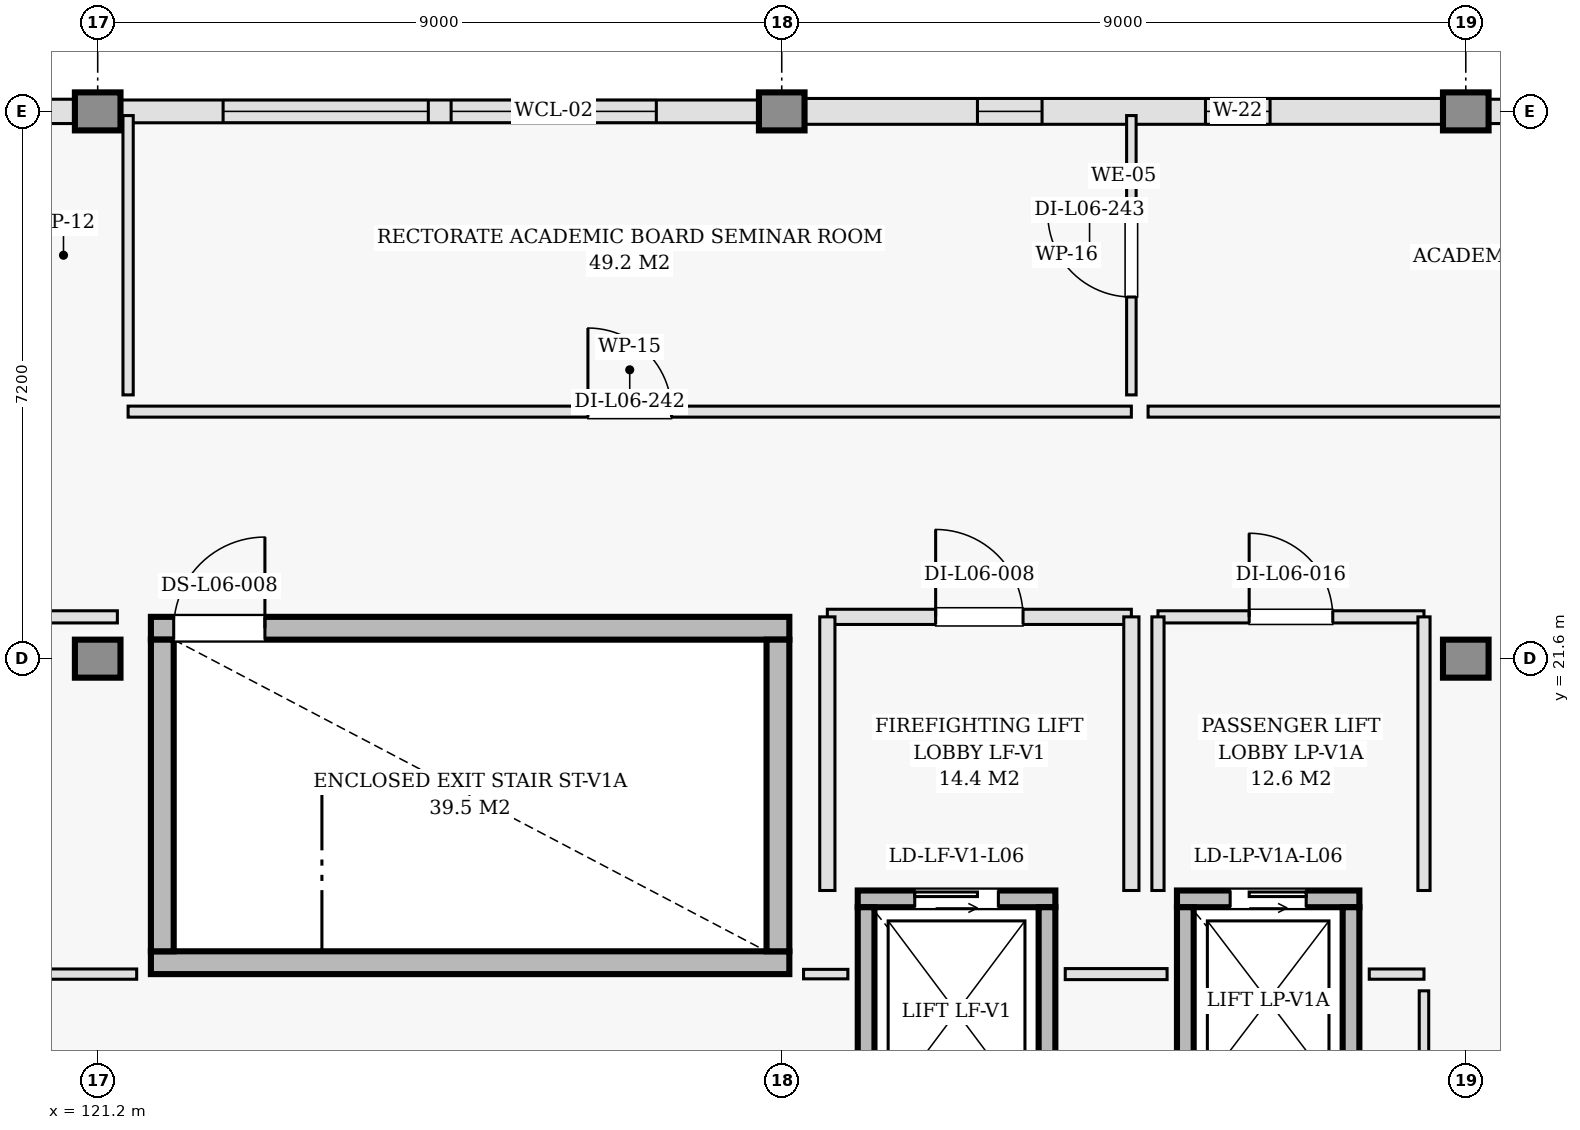
"""IFC4 building model, lengths in metres.
Left out: names, types, materials, properties, quantities, classifications, styles, units other than length and angle.
Written with IfcOpenShell. Run it as: python <this file> out.ifc"""

import sys

from ifc_helpers import new_model, si_unit, direction, frame, frame_2d, origin, origin_2d, place, context, subcontext, project, spatial, rectangle, extrude, element, fill, save


model = new_model("IFC4")
c1 = context("Model", 3, precision=1e-05, world=origin(), true_north=direction((0.0, 1.0)))
c2 = subcontext(c1, "Body", "Model", "MODEL_VIEW")
j1 = project(units=[si_unit("LENGTHUNIT", "METRE"), si_unit("PLANEANGLEUNIT", "RADIAN")], contexts=[c1])
p1 = place(None, origin())
s1 = spatial("IfcSite", under=j1, at=p1, CompositionType="ELEMENT")
p2 = place(p1, origin())
s2 = spatial("IfcBuilding", under=s1, at=p2, CompositionType="ELEMENT")
p3 = place(p2, frame((0.0, 0.0, 26.4)))
s3 = spatial("IfcBuildingStorey", under=s2, at=p3, CompositionType="ELEMENT", Elevation=26.4)
for number, where, z_axis, x_axis in (
    (1, (121.2, 21.6, 0.0), (0.0, 0.0, 1.0), (1.0, 0.0, 0.0)),
    (2, (121.2, 28.8, 0.0), (0.0, 0.0, 1.0), (1.0, 0.0, 0.0)),
    (3, (130.2, 28.8, 0.0), (0.0, 0.0, 1.0), (1.0, 0.0, 0.0)),
    (4, (139.2, 21.6, 0.0), (0.0, 0.0, 1.0), (1.0, 0.0, 0.0)),
    (5, (139.2, 28.8, 0.0), (0.0, 0.0, 1.0), (1.0, 0.0, 0.0)),
):
    element("IfcColumn", number, at=place(p3, frame(where, z_axis=z_axis, x_axis=x_axis)), inside=s3, PredefinedType="COLUMN", context=c2, shape_type="SweptSolid", body=[
        extrude(rectangle(XDim=0.5, YDim=0.5, at=origin_2d()), origin(), (0.0, 0.0, 1.0), 3.45),
    ])
p4 = place(p3, frame((148.2, 28.8, 0.0), z_axis=(0.0, 0.0, 1.0), x_axis=(-1.0, 0.0, 0.0)))
e6 = element("IfcWall", 6, at=p4, inside=s3, PredefinedType="SOLIDWALL", context=c2, shape_type="SweptSolid", body=[
    extrude(rectangle(XDim=9.0, YDim=0.32, at=frame_2d((4.5, 0.0))), origin(), (0.0, 0.0, 1.0), 2.555),
])
p5 = place(p4, frame((2.475, 0.0, 0.9)))
e7 = element("IfcOpeningElement", 7, at=p5, cuts=e6, PredefinedType="OPENING", context=c2, shape_type="SweptSolid", body=[
    extrude(rectangle(XDim=1.05, YDim=1.4, at=frame_2d((0.525, 0.7))), frame((0.0, 0.17, 0.0), z_axis=(0.0, -1.0, 0.0), x_axis=(1.0, 0.0, 0.0)), (0.0, 0.0, 1.0), 0.34),
])
p6 = place(p4, frame((5.475, 0.0, 0.9)))
e8 = element("IfcOpeningElement", 8, at=p6, cuts=e6, PredefinedType="OPENING", context=c2, shape_type="SweptSolid", body=[
    extrude(rectangle(XDim=1.05, YDim=1.4, at=frame_2d((0.525, 0.7))), frame((0.0, 0.17, 0.0), z_axis=(0.0, -1.0, 0.0), x_axis=(1.0, 0.0, 0.0)), (0.0, 0.0, 1.0), 0.34),
])
p7 = place(p3, frame((139.2, 28.8, 0.0), z_axis=(0.0, 0.0, 1.0), x_axis=(-1.0, 0.0, 0.0)))
e9 = element("IfcWall", 9, at=p7, inside=s3, PredefinedType="SOLIDWALL", context=c2, shape_type="SweptSolid", body=[
    extrude(rectangle(XDim=9.0, YDim=0.34, at=frame_2d((4.5, 0.0))), origin(), (0.0, 0.0, 1.0), 2.555),
])
p8 = place(p7, frame((2.575, 0.0, 0.9)))
e10 = element("IfcOpeningElement", 10, at=p8, cuts=e9, PredefinedType="OPENING", context=c2, shape_type="SweptSolid", body=[
    extrude(rectangle(XDim=0.85, YDim=1.3, at=frame_2d((0.425, 0.65))), frame((0.0, 0.18, 0.0), z_axis=(0.0, -1.0, 0.0), x_axis=(1.0, 0.0, 0.0)), (0.0, 0.0, 1.0), 0.36),
])
p9 = place(p7, frame((5.575, 0.0, 0.9)))
e11 = element("IfcOpeningElement", 11, at=p9, cuts=e9, PredefinedType="OPENING", context=c2, shape_type="SweptSolid", body=[
    extrude(rectangle(XDim=0.85, YDim=1.3, at=frame_2d((0.425, 0.65))), frame((0.0, 0.18, 0.0), z_axis=(0.0, -1.0, 0.0), x_axis=(1.0, 0.0, 0.0)), (0.0, 0.0, 1.0), 0.36),
])
p10 = place(p3, frame((130.2, 28.8, 0.0), z_axis=(0.0, 0.0, 1.0), x_axis=(-1.0, 0.0, 0.0)))
e12 = element("IfcWall", 12, at=p10, inside=s3, PredefinedType="SOLIDWALL", context=c2, shape_type="SweptSolid", body=[
    extrude(rectangle(XDim=9.0, YDim=0.3, at=frame_2d((4.5, 0.0))), origin(), (0.0, 0.0, 1.0), 2.555),
])
p11 = place(p10, frame((1.65, 0.0, 1.285)))
e13 = element("IfcOpeningElement", 13, at=p11, cuts=e12, PredefinedType="OPENING", context=c2, shape_type="SweptSolid", body=[
    extrude(rectangle(XDim=2.7, YDim=1.05, at=frame_2d((1.35, 0.525))), frame((0.0, 0.16, 0.0), z_axis=(0.0, -1.0, 0.0), x_axis=(1.0, 0.0, 0.0)), (0.0, 0.0, 1.0), 0.32),
])
p12 = place(p10, frame((4.65, 0.0, 1.285)))
e14 = element("IfcOpeningElement", 14, at=p12, cuts=e12, PredefinedType="OPENING", context=c2, shape_type="SweptSolid", body=[
    extrude(rectangle(XDim=2.7, YDim=1.05, at=frame_2d((1.35, 0.525))), frame((0.0, 0.16, 0.0), z_axis=(0.0, -1.0, 0.0), x_axis=(1.0, 0.0, 0.0)), (0.0, 0.0, 1.0), 0.32),
])
p13 = place(p3, frame((121.2, 28.8, 0.0), z_axis=(0.0, 0.0, 1.0), x_axis=(-1.0, 0.0, 0.0)))
e15 = element("IfcWall", 15, at=p13, inside=s3, PredefinedType="SOLIDWALL", context=c2, shape_type="SweptSolid", body=[
    extrude(rectangle(XDim=8.75, YDim=0.32, at=frame_2d((4.375, 0.0))), origin(), (0.0, 0.0, 1.0), 2.555),
])
p14 = place(p13, frame((2.442, 0.0, 1.385)))
e16 = element("IfcOpeningElement", 16, at=p14, cuts=e15, PredefinedType="OPENING", context=c2, shape_type="SweptSolid", body=[
    extrude(rectangle(XDim=0.95, YDim=0.95, at=frame_2d((0.475, 0.475))), frame((0.0, 0.17, 0.0), z_axis=(0.0, -1.0, 0.0), x_axis=(1.0, 0.0, 0.0)), (0.0, 0.0, 1.0), 0.34),
])
p15 = place(p13, frame((4.783, 0.0, 1.385)))
e17 = element("IfcOpeningElement", 17, at=p15, cuts=e15, PredefinedType="OPENING", context=c2, shape_type="SweptSolid", body=[
    extrude(rectangle(XDim=2.1, YDim=0.95, at=frame_2d((1.05, 0.475))), frame((0.0, 0.17, 0.0), z_axis=(0.0, -1.0, 0.0), x_axis=(1.0, 0.0, 0.0)), (0.0, 0.0, 1.0), 0.34),
])
p16 = place(p3, frame((121.9, 17.6, 0.0), z_axis=(0.0, 0.0, 1.0), x_axis=(1.0, 0.0, 0.0)))
e18 = element("IfcWall", 18, at=p16, inside=s3, PredefinedType="SHEAR", context=c2, shape_type="SweptSolid", body=[
    extrude(rectangle(XDim=8.4, YDim=0.3, at=frame_2d((4.2, 0.0))), origin(), (0.0, 0.0, 1.0), 3.22),
])
p17 = place(p3, frame((121.9, 22.0, 0.0), z_axis=(0.0, 0.0, 1.0), x_axis=(1.0, 0.0, 0.0)))
e19 = element("IfcWall", 19, at=p17, inside=s3, PredefinedType="SHEAR", context=c2, shape_type="SweptSolid", body=[
    extrude(rectangle(XDim=8.4, YDim=0.3, at=frame_2d((4.2, 0.0))), origin(), (0.0, 0.0, 1.0), 3.22),
])
p18 = place(p17, frame((0.3, 0.0, 0.0)))
e20 = element("IfcOpeningElement", 20, at=p18, cuts=e19, PredefinedType="OPENING", context=c2, shape_type="SweptSolid", body=[
    extrude(rectangle(XDim=1.2, YDim=2.15, at=frame_2d((0.6, 1.075))), frame((0.0, 0.16, 0.0), z_axis=(0.0, -1.0, 0.0), x_axis=(1.0, 0.0, 0.0)), (0.0, 0.0, 1.0), 0.32),
])
for number, where, z_axis, x_axis in (
    (21, (122.05, 17.75, 0.0), (0.0, 0.0, 1.0), (0.0, 1.0, 0.0)),
    (22, (130.15, 17.75, 0.0), (0.0, 0.0, 1.0), (0.0, 1.0, 0.0)),
):
    element("IfcWall", number, at=place(p3, frame(where, z_axis=z_axis, x_axis=x_axis)), inside=s3, PredefinedType="SHEAR", context=c2, shape_type="SweptSolid", body=[
        extrude(rectangle(XDim=4.1, YDim=0.3, at=frame_2d((2.05, 0.0))), origin(), (0.0, 0.0, 1.0), 3.22),
    ])
p19 = place(p3, frame((131.2, 18.44, 0.0), z_axis=(0.0, 0.0, 1.0), x_axis=(1.0, 0.0, 0.0)))
e23 = element("IfcWall", 23, at=p19, inside=s3, PredefinedType="SHEAR", context=c2, shape_type="SweptSolid", body=[
    extrude(rectangle(XDim=2.6, YDim=0.22, at=frame_2d((1.3, 0.0))), origin(), (0.0, 0.0, 1.0), 3.22),
])
p20 = place(p19, frame((0.75, 0.0, 0.0)))
e24 = element("IfcOpeningElement", 24, at=p20, cuts=e23, PredefinedType="OPENING", context=c2, shape_type="SweptSolid", body=[
    extrude(rectangle(XDim=1.1, YDim=2.15, at=frame_2d((0.55, 1.075))), frame((0.0, 0.12, 0.0), z_axis=(0.0, -1.0, 0.0), x_axis=(1.0, 0.0, 0.0)), (0.0, 0.0, 1.0), 0.24),
])
for number, where, z_axis, x_axis in (
    (25, (131.31, 15.57, 0.0), (0.0, 0.0, 1.0), (0.0, 1.0, 0.0)),
    (26, (133.69, 15.57, 0.0), (0.0, 0.0, 1.0), (0.0, 1.0, 0.0)),
):
    element("IfcWall", number, at=place(p3, frame(where, z_axis=z_axis, x_axis=x_axis)), inside=s3, PredefinedType="SHEAR", context=c2, shape_type="SweptSolid", body=[
        extrude(rectangle(XDim=2.76, YDim=0.22, at=frame_2d((1.38, 0.0))), origin(), (0.0, 0.0, 1.0), 3.22),
    ])
p21 = place(p3, frame((130.8, 22.15, 0.0), z_axis=(0.0, 0.0, 1.0), x_axis=(1.0, 0.0, 0.0)))
e27 = element("IfcWall", 27, at=p21, inside=s3, PredefinedType="PARTITIONING", context=c2, shape_type="SweptSolid", body=[
    extrude(rectangle(XDim=4.0, YDim=0.2, at=frame_2d((2.0, 0.0))), origin(), (0.0, 0.0, 1.0), 3.22),
])
p22 = place(p21, frame((1.425, 0.0, 0.0)))
e28 = element("IfcOpeningElement", 28, at=p22, cuts=e27, PredefinedType="OPENING", context=c2, shape_type="SweptSolid", body=[
    extrude(rectangle(XDim=1.15, YDim=2.15, at=frame_2d((0.575, 1.075))), frame((0.0, 0.11, 0.0), z_axis=(0.0, -1.0, 0.0), x_axis=(1.0, 0.0, 0.0)), (0.0, 0.0, 1.0), 0.22),
])
for number, where, z_axis, x_axis in (
    (29, (130.8, 18.55, 0.0), (0.0, 0.0, 1.0), (0.0, 1.0, 0.0)),
    (30, (134.8, 18.55, 0.0), (0.0, 0.0, 1.0), (0.0, 1.0, 0.0)),
):
    element("IfcWall", number, at=place(p3, frame(where, z_axis=z_axis, x_axis=x_axis)), inside=s3, PredefinedType="PARTITIONING", context=c2, shape_type="SweptSolid", body=[
        extrude(rectangle(XDim=3.6, YDim=0.2, at=frame_2d((1.8, 0.0))), origin(), (0.0, 0.0, 1.0), 2.405),
    ])
p23 = place(p3, frame((135.4, 18.44, 0.0), z_axis=(0.0, 0.0, 1.0), x_axis=(1.0, 0.0, 0.0)))
e31 = element("IfcWall", 31, at=p23, inside=s3, PredefinedType="SHEAR", context=c2, shape_type="SweptSolid", body=[
    extrude(rectangle(XDim=2.4, YDim=0.22, at=frame_2d((1.2, 0.0))), origin(), (0.0, 0.0, 1.0), 3.22),
])
p24 = place(p23, frame((0.7, 0.0, 0.0)))
e32 = element("IfcOpeningElement", 32, at=p24, cuts=e31, PredefinedType="OPENING", context=c2, shape_type="SweptSolid", body=[
    extrude(rectangle(XDim=1.0, YDim=2.15, at=frame_2d((0.5, 1.075))), frame((0.0, 0.12, 0.0), z_axis=(0.0, -1.0, 0.0), x_axis=(1.0, 0.0, 0.0)), (0.0, 0.0, 1.0), 0.24),
])
for number, where, z_axis, x_axis in (
    (33, (135.51, 15.87, 0.0), (0.0, 0.0, 1.0), (0.0, 1.0, 0.0)),
    (34, (137.69, 15.87, 0.0), (0.0, 0.0, 1.0), (0.0, 1.0, 0.0)),
):
    element("IfcWall", number, at=place(p3, frame(where, z_axis=z_axis, x_axis=x_axis)), inside=s3, PredefinedType="SHEAR", context=c2, shape_type="SweptSolid", body=[
        extrude(rectangle(XDim=2.46, YDim=0.22, at=frame_2d((1.23, 0.0))), origin(), (0.0, 0.0, 1.0), 3.22),
    ])
p25 = place(p3, frame((135.15, 22.15, 0.0), z_axis=(0.0, 0.0, 1.0), x_axis=(1.0, 0.0, 0.0)))
e35 = element("IfcWall", 35, at=p25, inside=s3, PredefinedType="PARTITIONING", context=c2, shape_type="SweptSolid", body=[
    extrude(rectangle(XDim=3.5, YDim=0.16, at=frame_2d((1.75, 0.0))), origin(), (0.0, 0.0, 1.0), 3.22),
])
p26 = place(p25, frame((1.2, 0.0, 0.0)))
e36 = element("IfcOpeningElement", 36, at=p26, cuts=e35, PredefinedType="OPENING", context=c2, shape_type="SweptSolid", body=[
    extrude(rectangle(XDim=1.1, YDim=2.15, at=frame_2d((0.55, 1.075))), frame((0.0, 0.09, 0.0), z_axis=(0.0, -1.0, 0.0), x_axis=(1.0, 0.0, 0.0)), (0.0, 0.0, 1.0), 0.18),
])
for number, where, z_axis, x_axis in (
    (37, (135.15, 18.55, 0.0), (0.0, 0.0, 1.0), (0.0, 1.0, 0.0)),
    (38, (138.65, 18.55, 0.0), (0.0, 0.0, 1.0), (0.0, 1.0, 0.0)),
):
    element("IfcWall", number, at=place(p3, frame(where, z_axis=z_axis, x_axis=x_axis)), inside=s3, PredefinedType="PARTITIONING", context=c2, shape_type="SweptSolid", body=[
        extrude(rectangle(XDim=3.6, YDim=0.16, at=frame_2d((1.8, 0.0))), origin(), (0.0, 0.0, 1.0), 2.405),
    ])
p27 = place(p3, frame((121.6, 24.85, 0.0), z_axis=(0.0, 0.0, 1.0), x_axis=(1.0, 0.0, 0.0)))
e39 = element("IfcWall", 39, at=p27, inside=s3, PredefinedType="PARTITIONING", context=c2, shape_type="SweptSolid", body=[
    extrude(rectangle(XDim=13.2, YDim=0.145, at=frame_2d((6.6, 0.0))), origin(), (0.0, 0.0, 1.0), 2.555),
])
p28 = place(p27, frame((6.05, 0.0, 0.0)))
e40 = element("IfcOpeningElement", 40, at=p28, cuts=e39, PredefinedType="OPENING", context=c2, shape_type="SweptSolid", body=[
    extrude(rectangle(XDim=1.1, YDim=2.15, at=frame_2d((0.55, 1.075))), frame((0.0, 0.083, 0.0), z_axis=(0.0, -1.0, 0.0), x_axis=(1.0, 0.0, 0.0)), (0.0, 0.0, 1.0), 0.165),
])
p29 = place(p3, frame((121.6, 25.07, 0.0), z_axis=(0.0, 0.0, 1.0), x_axis=(0.0, 1.0, 0.0)))
e41 = element("IfcWall", 41, at=p29, inside=s3, PredefinedType="PARTITIONING", context=c2, shape_type="SweptSolid", body=[
    extrude(rectangle(XDim=3.675, YDim=0.135, at=frame_2d((1.837, 0.0))), origin(), (0.0, 0.0, 1.0), 3.22),
])
p30 = place(p3, frame((134.8, 25.07, 0.0), z_axis=(0.0, 0.0, 1.0), x_axis=(0.0, 1.0, 0.0)))
e42 = element("IfcWall", 42, at=p30, inside=s3, PredefinedType="PARTITIONING", context=c2, shape_type="SweptSolid", body=[
    extrude(rectangle(XDim=3.675, YDim=0.125, at=frame_2d((1.837, 0.0))), origin(), (0.0, 0.0, 1.0), 3.22),
])
p31 = place(p30, frame((1.288, 0.0, 0.0)))
e43 = element("IfcOpeningElement", 43, at=p31, cuts=e42, PredefinedType="OPENING", context=c2, shape_type="SweptSolid", body=[
    extrude(rectangle(XDim=1.1, YDim=2.15, at=frame_2d((0.55, 1.075))), frame((0.0, 0.073, 0.0), z_axis=(0.0, -1.0, 0.0), x_axis=(1.0, 0.0, 0.0)), (0.0, 0.0, 1.0), 0.145),
])
p32 = place(p3, frame((135.02, 24.85, 0.0), z_axis=(0.0, 0.0, 1.0), x_axis=(1.0, 0.0, 0.0)))
e44 = element("IfcWall", 44, at=p32, inside=s3, PredefinedType="PARTITIONING", context=c2, shape_type="SweptSolid", body=[
    extrude(rectangle(XDim=13.18, YDim=0.145, at=frame_2d((6.59, 0.0))), origin(), (0.0, 0.0, 1.0), 2.555),
])
p33 = place(p3, frame((119.82, 17.45, 0.0), z_axis=(0.0, 0.0, 1.0), x_axis=(1.0, 0.0, 0.0)))
e45 = element("IfcWall", 45, at=p33, inside=s3, PredefinedType="PARTITIONING", context=c2, shape_type="SweptSolid", body=[
    extrude(rectangle(XDim=1.893, YDim=0.135, at=frame_2d((0.946, 0.0))), origin(), (0.0, 0.0, 1.0), 2.555),
])
p34 = place(p3, frame((130.487, 17.45, 0.0), z_axis=(0.0, 0.0, 1.0), x_axis=(1.0, 0.0, 0.0)))
e46 = element("IfcWall", 46, at=p34, inside=s3, PredefinedType="PARTITIONING", context=c2, shape_type="SweptSolid", body=[
    extrude(rectangle(XDim=0.583, YDim=0.125, at=frame_2d((0.292, 0.0))), origin(), (0.0, 0.0, 1.0), 3.22),
])
p35 = place(p3, frame((133.93, 17.45, 0.0), z_axis=(0.0, 0.0, 1.0), x_axis=(1.0, 0.0, 0.0)))
e47 = element("IfcWall", 47, at=p35, inside=s3, PredefinedType="PARTITIONING", context=c2, shape_type="SweptSolid", body=[
    extrude(rectangle(XDim=1.34, YDim=0.145, at=frame_2d((0.67, 0.0))), origin(), (0.0, 0.0, 1.0), 3.22),
])
p36 = place(p3, frame((137.93, 17.45, 0.0), z_axis=(0.0, 0.0, 1.0), x_axis=(1.0, 0.0, 0.0)))
e48 = element("IfcWall", 48, at=p36, inside=s3, PredefinedType="PARTITIONING", context=c2, shape_type="SweptSolid", body=[
    extrude(rectangle(XDim=0.72, YDim=0.135, at=frame_2d((0.36, 0.0))), origin(), (0.0, 0.0, 1.0), 3.22),
])
p37 = place(p3, frame((138.65, 14.6, 0.0), z_axis=(0.0, 0.0, 1.0), x_axis=(0.0, 1.0, 0.0)))
e49 = element("IfcWall", 49, at=p37, inside=s3, PredefinedType="PARTITIONING", context=c2, shape_type="SweptSolid", body=[
    extrude(rectangle(XDim=2.63, YDim=0.125, at=frame_2d((1.315, 0.0))), origin(), (0.0, 0.0, 1.0), 2.405),
])
p38 = place(p3, frame((119.6, 22.15, 0.0), z_axis=(0.0, 0.0, 1.0), x_axis=(1.0, 0.0, 0.0)))
e50 = element("IfcWall", 50, at=p38, inside=s3, PredefinedType="PARTITIONING", context=c2, shape_type="SweptSolid", body=[
    extrude(rectangle(XDim=1.859, YDim=0.16, at=frame_2d((0.929, 0.0))), origin(), (0.0, 0.0, 1.0), 2.555),
])
p39 = place(p8, origin())
e51 = element("IfcWindow", 51, at=p39, inside=s3, PartitioningType="DOUBLE_PANEL_VERTICAL", PredefinedType="WINDOW", context=c2, shape_type="SweptSolid", body=[
    extrude(rectangle(XDim=0.85, YDim=1.3, at=frame_2d((0.425, 0.65))), frame((0.0, 0.03, 0.0), z_axis=(0.0, -1.0, 0.0), x_axis=(1.0, 0.0, 0.0)), (0.0, 0.0, 1.0), 0.06),
])
fill(e10, e51)
p40 = place(p9, origin())
e52 = element("IfcWindow", 52, at=p40, inside=s3, PartitioningType="DOUBLE_PANEL_VERTICAL", PredefinedType="WINDOW", context=c2, shape_type="SweptSolid", body=[
    extrude(rectangle(XDim=0.85, YDim=1.3, at=frame_2d((0.425, 0.65))), frame((0.0, 0.03, 0.0), z_axis=(0.0, -1.0, 0.0), x_axis=(1.0, 0.0, 0.0)), (0.0, 0.0, 1.0), 0.06),
])
fill(e11, e52)
p41 = place(p11, origin())
e53 = element("IfcWindow", 53, at=p41, inside=s3, PartitioningType="DOUBLE_PANEL_VERTICAL", PredefinedType="WINDOW", context=c2, shape_type="SweptSolid", body=[
    extrude(rectangle(XDim=2.7, YDim=1.05, at=frame_2d((1.35, 0.525))), frame((0.0, 0.03, 0.0), z_axis=(0.0, -1.0, 0.0), x_axis=(1.0, 0.0, 0.0)), (0.0, 0.0, 1.0), 0.06),
])
fill(e13, e53)
p42 = place(p12, origin())
e54 = element("IfcWindow", 54, at=p42, inside=s3, PartitioningType="DOUBLE_PANEL_VERTICAL", PredefinedType="WINDOW", context=c2, shape_type="SweptSolid", body=[
    extrude(rectangle(XDim=2.7, YDim=1.05, at=frame_2d((1.35, 0.525))), frame((0.0, 0.03, 0.0), z_axis=(0.0, -1.0, 0.0), x_axis=(1.0, 0.0, 0.0)), (0.0, 0.0, 1.0), 0.06),
])
fill(e14, e54)
p43 = place(p18, origin())
e55 = element("IfcDoor", 55, at=p43, inside=s3, OperationType="SINGLE_SWING_RIGHT", PredefinedType="DOOR", context=c2, shape_type="SweptSolid", body=[
    extrude(rectangle(XDim=1.2, YDim=2.15, at=frame_2d((0.6, 1.075))), frame((0.0, 0.025, 0.0), z_axis=(0.0, -1.0, 0.0), x_axis=(1.0, 0.0, 0.0)), (0.0, 0.0, 1.0), 0.05),
])
fill(e20, e55)
p44 = place(p20, origin())
e56 = element("IfcDoor", 56, at=p44, inside=s3, OperationType="SLIDING_TO_LEFT", PredefinedType="DOOR", context=c2, shape_type="SweptSolid", body=[
    extrude(rectangle(XDim=1.1, YDim=2.15, at=frame_2d((0.55, 1.075))), frame((0.0, 0.025, 0.0), z_axis=(0.0, -1.0, 0.0), x_axis=(1.0, 0.0, 0.0)), (0.0, 0.0, 1.0), 0.05),
])
fill(e24, e56)
p45 = place(p22, origin())
e57 = element("IfcDoor", 57, at=p45, inside=s3, OperationType="SINGLE_SWING_LEFT", PredefinedType="DOOR", context=c2, shape_type="SweptSolid", body=[
    extrude(rectangle(XDim=1.15, YDim=2.15, at=frame_2d((0.575, 1.075))), frame((0.0, 0.025, 0.0), z_axis=(0.0, -1.0, 0.0), x_axis=(1.0, 0.0, 0.0)), (0.0, 0.0, 1.0), 0.05),
])
fill(e28, e57)
p46 = place(p24, origin())
e58 = element("IfcDoor", 58, at=p46, inside=s3, OperationType="SLIDING_TO_RIGHT", PredefinedType="DOOR", context=c2, shape_type="SweptSolid", body=[
    extrude(rectangle(XDim=1.0, YDim=2.15, at=frame_2d((0.5, 1.075))), frame((0.0, 0.025, 0.0), z_axis=(0.0, -1.0, 0.0), x_axis=(1.0, 0.0, 0.0)), (0.0, 0.0, 1.0), 0.05),
])
fill(e32, e58)
p47 = place(p26, origin())
e59 = element("IfcDoor", 59, at=p47, inside=s3, OperationType="SINGLE_SWING_LEFT", PredefinedType="DOOR", context=c2, shape_type="SweptSolid", body=[
    extrude(rectangle(XDim=1.1, YDim=2.15, at=frame_2d((0.55, 1.075))), frame((0.0, 0.025, 0.0), z_axis=(0.0, -1.0, 0.0), x_axis=(1.0, 0.0, 0.0)), (0.0, 0.0, 1.0), 0.05),
])
fill(e36, e59)
p48 = place(p28, origin())
e60 = element("IfcDoor", 60, at=p48, inside=s3, OperationType="SINGLE_SWING_LEFT", PredefinedType="DOOR", context=c2, shape_type="SweptSolid", body=[
    extrude(rectangle(XDim=1.1, YDim=2.15, at=frame_2d((0.55, 1.075))), frame((0.0, 0.025, 0.0), z_axis=(0.0, -1.0, 0.0), x_axis=(1.0, 0.0, 0.0)), (0.0, 0.0, 1.0), 0.05),
])
fill(e40, e60)
p49 = place(p31, origin())
e61 = element("IfcDoor", 61, at=p49, inside=s3, OperationType="SINGLE_SWING_RIGHT", PredefinedType="DOOR", context=c2, shape_type="SweptSolid", body=[
    extrude(rectangle(XDim=1.1, YDim=2.15, at=frame_2d((0.55, 1.075))), frame((0.0, 0.025, 0.0), z_axis=(0.0, -1.0, 0.0), x_axis=(1.0, 0.0, 0.0)), (0.0, 0.0, 1.0), 0.05),
])
fill(e43, e61)
save(model, sys.argv[1])
